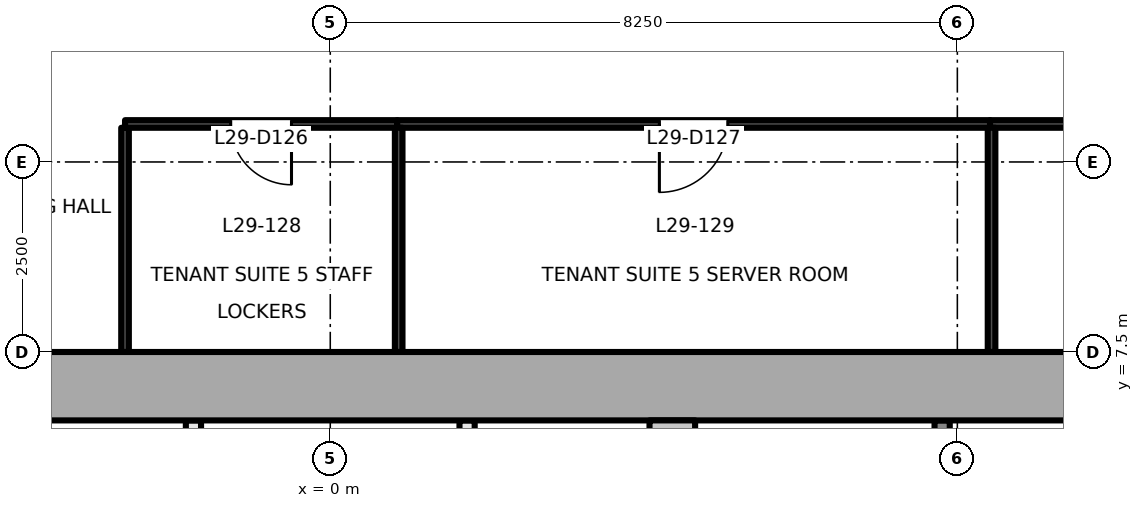
"""IFC4 building model, lengths in metres.
Left out: names, types, materials, properties, quantities, classifications, styles, units other than length and angle.
Written with IfcOpenShell. Run it as: python <this file> out.ifc"""

import sys

from ifc_helpers import new_model, si_unit, direction, frame, frame_2d, origin, place, context, subcontext, project, spatial, rectangle, extrude, element, fill, save


model = new_model("IFC4")
c1 = context("Model", 3, precision=1e-05, world=origin(), true_north=direction((0.0, 1.0)))
c2 = subcontext(c1, "Body", "Model", "MODEL_VIEW")
j1 = project(units=[si_unit("LENGTHUNIT", "METRE"), si_unit("PLANEANGLEUNIT", "RADIAN")], contexts=[c1])
p1 = place(None, origin())
s1 = spatial("IfcSite", under=j1, at=p1, CompositionType="ELEMENT")
p2 = place(p1, origin())
s2 = spatial("IfcBuilding", under=s1, at=p2, CompositionType="ELEMENT")
p3 = place(p2, frame((0.0, 0.0, 130.1)))
s3 = spatial("IfcBuildingStorey", under=s2, at=p3, CompositionType="ELEMENT", Elevation=130.1)
p4 = place(p3, frame((-18.0, 7.05, -0.2), z_axis=(0.0, 0.0, 1.0), x_axis=(1.0, 0.0, 0.0)))
e1 = element("IfcWall", 1, at=p4, inside=s3, PredefinedType="SHEAR", context=c2, shape_type="SweptSolid", body=[
    extrude(rectangle(XDim=36.0, YDim=0.9, at=frame_2d((18.0, 0.0))), origin(), (0.0, 0.0, 1.0), 4.0),
])
p5 = place(p3, frame((4.5, -6.6, -0.2), z_axis=(0.0, 0.0, 1.0), x_axis=(0.0, 1.0, 0.0)))
e2 = element("IfcWall", 2, at=p5, inside=s3, PredefinedType="SHEAR", context=c2, shape_type="SweptSolid", body=[
    extrude(rectangle(XDim=13.2, YDim=0.6, at=frame_2d((6.6, 0.0))), origin(), (0.0, 0.0, 1.0), 4.0),
])
p6 = place(p3, frame((-1.8, -6.6, 0.0), z_axis=(0.0, 0.0, 1.0), x_axis=(0.0, 1.0, 0.0)))
e3 = element("IfcWall", 3, at=p6, inside=s3, PredefinedType="PARTITIONING", context=c2, shape_type="SweptSolid", body=[
    extrude(rectangle(XDim=13.2, YDim=0.2, at=frame_2d((6.6, 0.0))), origin(), (0.0, 0.0, 1.0), 3.8),
])
p7 = place(p6, frame((0.55, 0.0, 0.0)))
e4 = element("IfcOpeningElement", 4, at=p7, cuts=e3, PredefinedType="OPENING", context=c2, shape_type="SweptSolid", body=[
    extrude(rectangle(XDim=0.9, YDim=2.1, at=frame_2d((0.45, 1.05))), frame((0.0, 0.111, 0.0), z_axis=(0.0, -1.0, 0.0), x_axis=(1.0, 0.0, 0.0)), (0.0, 0.0, 1.0), 0.221),
])
p8 = place(p3, frame((1.8, -6.6, 0.0), z_axis=(0.0, 0.0, 1.0), x_axis=(0.0, 1.0, 0.0)))
e5 = element("IfcWall", 5, at=p8, inside=s3, PredefinedType="PARTITIONING", context=c2, shape_type="SweptSolid", body=[
    extrude(rectangle(XDim=13.2, YDim=0.2, at=frame_2d((6.6, 0.0))), origin(), (0.0, 0.0, 1.0), 3.8),
])
p9 = place(p8, frame((0.55, 0.0, 0.0)))
e6 = element("IfcOpeningElement", 6, at=p9, cuts=e5, PredefinedType="OPENING", context=c2, shape_type="SweptSolid", body=[
    extrude(rectangle(XDim=0.9, YDim=2.1, at=frame_2d((0.45, 1.05))), frame((0.0, 0.111, 0.0), z_axis=(0.0, -1.0, 0.0), x_axis=(1.0, 0.0, 0.0)), (0.0, 0.0, 1.0), 0.221),
])
p10 = place(p3, frame((8.05, -6.6, 0.0), z_axis=(0.0, 0.0, 1.0), x_axis=(0.0, 1.0, 0.0)))
e7 = element("IfcWall", 7, at=p10, inside=s3, PredefinedType="PARTITIONING", context=c2, shape_type="SweptSolid", body=[
    extrude(rectangle(XDim=13.2, YDim=0.2, at=frame_2d((6.6, 0.0))), origin(), (0.0, 0.0, 1.0), 3.8),
])
p11 = place(p10, frame((0.298, 0.0, 0.0)))
e8 = element("IfcOpeningElement", 8, at=p11, cuts=e7, PredefinedType="OPENING", context=c2, shape_type="SweptSolid", body=[
    extrude(rectangle(XDim=0.9, YDim=2.1, at=frame_2d((0.45, 1.05))), frame((0.0, 0.111, 0.0), z_axis=(0.0, -1.0, 0.0), x_axis=(1.0, 0.0, 0.0)), (0.0, 0.0, 1.0), 0.221),
])
p12 = place(p10, frame((2.066, 0.0, 0.0)))
e9 = element("IfcOpeningElement", 9, at=p12, cuts=e7, PredefinedType="OPENING", context=c2, shape_type="SweptSolid", body=[
    extrude(rectangle(XDim=0.9, YDim=2.1, at=frame_2d((0.45, 1.05))), frame((0.0, 0.111, 0.0), z_axis=(0.0, -1.0, 0.0), x_axis=(1.0, 0.0, 0.0)), (0.0, 0.0, 1.0), 0.221),
])
p13 = place(p10, frame((3.834, 0.0, 0.0)))
e10 = element("IfcOpeningElement", 10, at=p13, cuts=e7, PredefinedType="OPENING", context=c2, shape_type="SweptSolid", body=[
    extrude(rectangle(XDim=0.9, YDim=2.1, at=frame_2d((0.45, 1.05))), frame((0.0, 0.111, 0.0), z_axis=(0.0, -1.0, 0.0), x_axis=(1.0, 0.0, 0.0)), (0.0, 0.0, 1.0), 0.221),
])
p14 = place(p10, frame((5.466, 0.0, 0.0)))
e11 = element("IfcOpeningElement", 11, at=p14, cuts=e7, PredefinedType="OPENING", context=c2, shape_type="SweptSolid", body=[
    extrude(rectangle(XDim=0.9, YDim=2.1, at=frame_2d((0.45, 1.05))), frame((0.0, 0.111, 0.0), z_axis=(0.0, -1.0, 0.0), x_axis=(1.0, 0.0, 0.0)), (0.0, 0.0, 1.0), 0.221),
])
p15 = place(p10, frame((11.9, 0.0, 0.0)))
e12 = element("IfcOpeningElement", 12, at=p15, cuts=e7, PredefinedType="OPENING", context=c2, shape_type="SweptSolid", body=[
    extrude(rectangle(XDim=1.1, YDim=2.1, at=frame_2d((0.55, 1.05))), frame((0.0, 0.111, 0.0), z_axis=(0.0, -1.0, 0.0), x_axis=(1.0, 0.0, 0.0)), (0.0, 0.0, 1.0), 0.221),
])
p16 = place(p3, frame((-2.7, 10.45, 0.0), z_axis=(0.0, 0.0, 1.0), x_axis=(0.0, -1.0, 0.0)))
e13 = element("IfcWall", 13, at=p16, inside=s3, PredefinedType="PARTITIONING", context=c2, shape_type="SweptSolid", body=[
    extrude(rectangle(XDim=2.95, YDim=0.1, at=frame_2d((1.475, 0.0))), origin(), (0.0, 0.0, 1.0), 3.8),
])
p17 = place(p3, frame((0.88, 10.5, 0.0), z_axis=(0.0, 0.0, 1.0), x_axis=(-1.0, 0.0, 0.0)))
e14 = element("IfcWall", 14, at=p17, inside=s3, PredefinedType="PARTITIONING", context=c2, shape_type="SweptSolid", body=[
    extrude(rectangle(XDim=3.58, YDim=0.1, at=frame_2d((1.79, 0.0))), origin(), (0.0, 0.0, 1.0), 3.5),
])
p18 = place(p17, frame((1.39, 0.0, 0.0)))
e15 = element("IfcOpeningElement", 15, at=p18, cuts=e14, PredefinedType="OPENING", context=c2, shape_type="SweptSolid", body=[
    extrude(rectangle(XDim=0.8, YDim=2.1, at=frame_2d((0.4, 1.05))), frame((0.0, 0.061, 0.0), z_axis=(0.0, -1.0, 0.0), x_axis=(1.0, 0.0, 0.0)), (0.0, 0.0, 1.0), 0.121),
])
p19 = place(p3, frame((8.68, 10.5, 0.0), z_axis=(0.0, 0.0, 1.0), x_axis=(-1.0, 0.0, 0.0)))
e16 = element("IfcWall", 16, at=p19, inside=s3, PredefinedType="PARTITIONING", context=c2, shape_type="SweptSolid", body=[
    extrude(rectangle(XDim=7.8, YDim=0.1, at=frame_2d((3.9, 0.0))), origin(), (0.0, 0.0, 1.0), 3.5),
])
p20 = place(p19, frame((3.45, 0.0, 0.0)))
e17 = element("IfcOpeningElement", 17, at=p20, cuts=e16, PredefinedType="OPENING", context=c2, shape_type="SweptSolid", body=[
    extrude(rectangle(XDim=0.9, YDim=2.1, at=frame_2d((0.45, 1.05))), frame((0.0, 0.061, 0.0), z_axis=(0.0, -1.0, 0.0), x_axis=(1.0, 0.0, 0.0)), (0.0, 0.0, 1.0), 0.121),
])
p21 = place(p3, frame((17.7, 10.5, 0.0), z_axis=(0.0, 0.0, 1.0), x_axis=(-1.0, 0.0, 0.0)))
e18 = element("IfcWall", 18, at=p21, inside=s3, PredefinedType="PARTITIONING", context=c2, shape_type="SweptSolid", body=[
    extrude(rectangle(XDim=9.02, YDim=0.1, at=frame_2d((4.51, 0.0))), origin(), (0.0, 0.0, 1.0), 3.5),
])
p22 = place(p21, frame((2.566, 0.0, 0.0)))
e19 = element("IfcOpeningElement", 19, at=p22, cuts=e18, PredefinedType="OPENING", context=c2, shape_type="SweptSolid", body=[
    extrude(rectangle(XDim=0.8, YDim=2.1, at=frame_2d((0.4, 1.05))), frame((0.0, 0.061, 0.0), z_axis=(0.0, -1.0, 0.0), x_axis=(1.0, 0.0, 0.0)), (0.0, 0.0, 1.0), 0.121),
])
for number, where, z_axis, x_axis in (
    (20, (0.9, 10.45, 0.0), (0.0, 0.0, 1.0), (0.0, -1.0, 0.0)),
    (21, (8.7, 10.45, 0.0), (0.0, 0.0, 1.0), (0.0, -1.0, 0.0)),
):
    element("IfcWall", number, at=place(p3, frame(where, z_axis=z_axis, x_axis=x_axis)), inside=s3, PredefinedType="PARTITIONING", context=c2, shape_type="SweptSolid", body=[
        extrude(rectangle(XDim=2.95, YDim=0.1, at=frame_2d((1.475, 0.0))), origin(), (0.0, 0.0, 1.0), 3.8),
    ])
p23 = place(p18, origin())
e22 = element("IfcDoor", 22, at=p23, inside=s3, OperationType="SINGLE_SWING_LEFT", PredefinedType="DOOR", context=c2, shape_type="SweptSolid", body=[
    extrude(rectangle(XDim=0.8, YDim=2.1, at=frame_2d((0.4, 1.05))), frame((0.0, 0.025, 0.0), z_axis=(0.0, -1.0, 0.0), x_axis=(1.0, 0.0, 0.0)), (0.0, 0.0, 1.0), 0.05),
])
fill(e15, e22)
p24 = place(p20, origin())
e23 = element("IfcDoor", 23, at=p24, inside=s3, OperationType="SINGLE_SWING_RIGHT", PredefinedType="DOOR", context=c2, shape_type="SweptSolid", body=[
    extrude(rectangle(XDim=0.9, YDim=2.1, at=frame_2d((0.45, 1.05))), frame((0.0, 0.025, 0.0), z_axis=(0.0, -1.0, 0.0), x_axis=(1.0, 0.0, 0.0)), (0.0, 0.0, 1.0), 0.05),
])
fill(e17, e23)
save(model, sys.argv[1])
